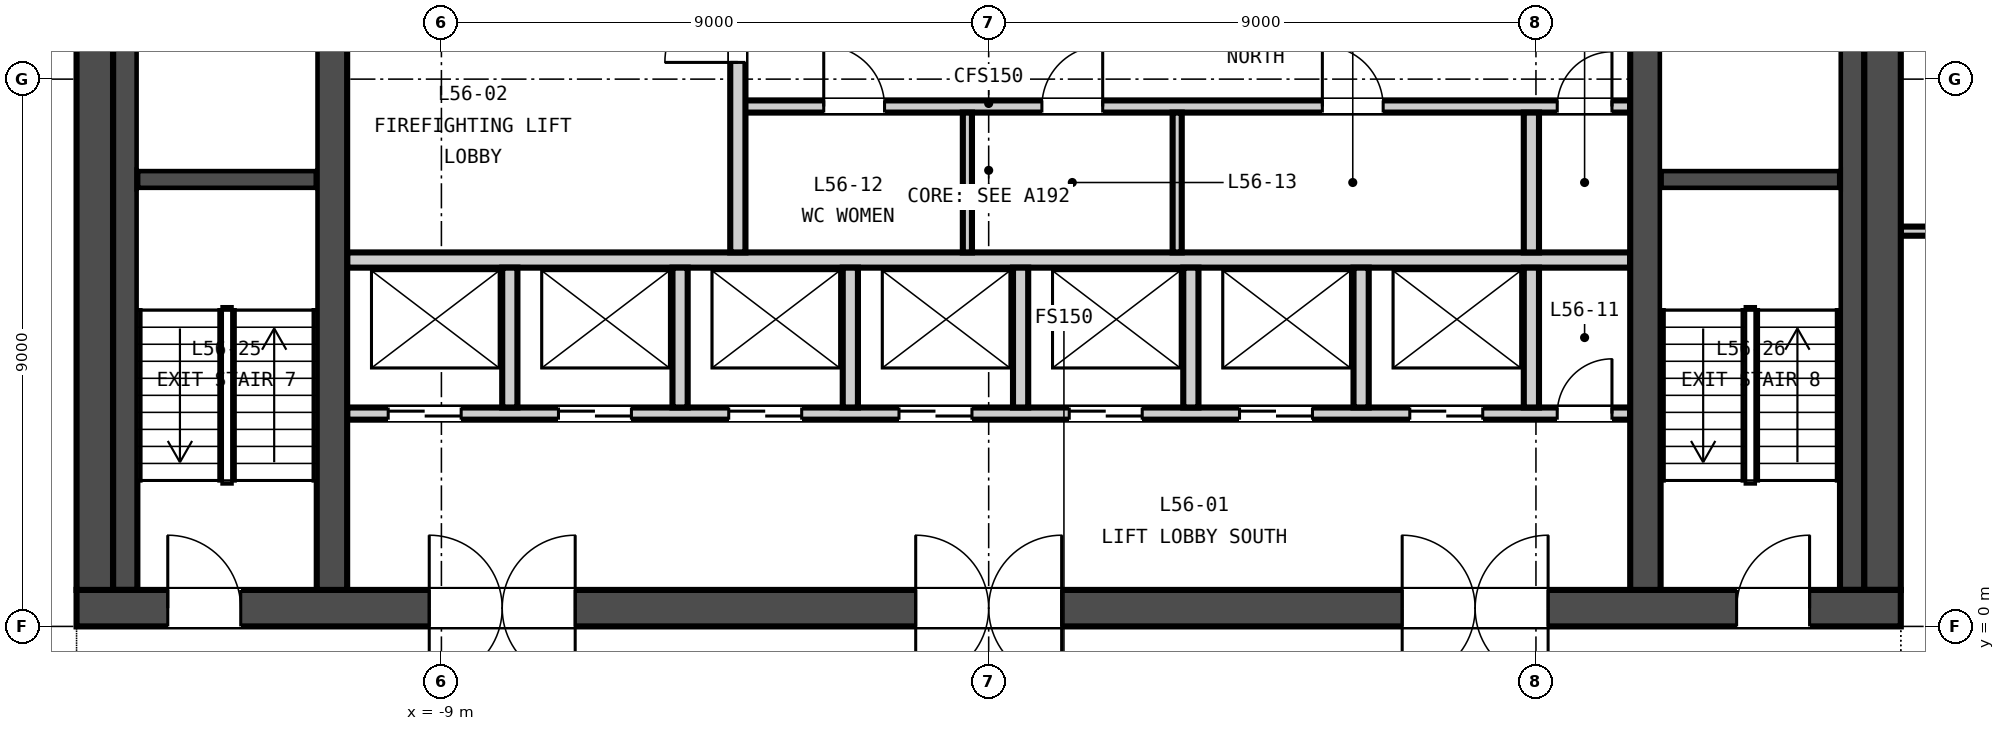
"""IFC4 building model, lengths in metres.
Left out: names, types, materials, properties, quantities, classifications, styles, units other than length and angle.
Written with IfcOpenShell. Run it as: python <this file> out.ifc"""

import sys

from ifc_helpers import new_model, si_unit, direction, frame, frame_2d, origin, place, context, subcontext, project, spatial, rectangle, extrude, element, fill, save


model = new_model("IFC4")
c1 = context("Model", 3, precision=1e-05, world=origin(), true_north=direction((0.0, 1.0)))
c2 = subcontext(c1, "Body", "Model", "MODEL_VIEW")
j1 = project(units=[si_unit("LENGTHUNIT", "METRE"), si_unit("PLANEANGLEUNIT", "RADIAN")], contexts=[c1])
p1 = place(None, origin())
s1 = spatial("IfcSite", under=j1, at=p1, CompositionType="ELEMENT")
p2 = place(p1, origin())
s2 = spatial("IfcBuilding", under=s1, at=p2, CompositionType="ELEMENT")
p3 = place(p2, frame((0.0, 0.0, 223.6)))
s3 = spatial("IfcBuildingStorey", under=s2, at=p3, CompositionType="ELEMENT", Elevation=223.6)
p4 = place(p3, frame((-15.0, 0.3, -0.15), z_axis=(0.0, 0.0, 1.0), x_axis=(1.0, 0.0, 0.0)))
e1 = element("IfcWall", 1, at=p4, inside=s3, PredefinedType="SOLIDWALL", context=c2, shape_type="SweptSolid", body=[
    extrude(rectangle(XDim=30.0, YDim=0.6, at=frame_2d((15.0, 0.0))), origin(), (0.0, 0.0, 1.0), 3.65),
])
p5 = place(p4, frame((5.8, 0.0, 0.15)))
e2 = element("IfcOpeningElement", 2, at=p5, cuts=e1, PredefinedType="OPENING", context=c2, shape_type="SweptSolid", body=[
    extrude(rectangle(XDim=2.4, YDim=2.4, at=frame_2d((1.2, 1.2))), frame((0.0, 0.31, 0.0), z_axis=(0.0, -1.0, 0.0), x_axis=(1.0, 0.0, 0.0)), (0.0, 0.0, 1.0), 0.62),
])
p6 = place(p4, frame((13.8, 0.0, 0.15)))
e3 = element("IfcOpeningElement", 3, at=p6, cuts=e1, PredefinedType="OPENING", context=c2, shape_type="SweptSolid", body=[
    extrude(rectangle(XDim=2.4, YDim=2.4, at=frame_2d((1.2, 1.2))), frame((0.0, 0.31, 0.0), z_axis=(0.0, -1.0, 0.0), x_axis=(1.0, 0.0, 0.0)), (0.0, 0.0, 1.0), 0.62),
])
p7 = place(p4, frame((21.8, 0.0, 0.15)))
e4 = element("IfcOpeningElement", 4, at=p7, cuts=e1, PredefinedType="OPENING", context=c2, shape_type="SweptSolid", body=[
    extrude(rectangle(XDim=2.4, YDim=2.4, at=frame_2d((1.2, 1.2))), frame((0.0, 0.31, 0.0), z_axis=(0.0, -1.0, 0.0), x_axis=(1.0, 0.0, 0.0)), (0.0, 0.0, 1.0), 0.62),
])
p8 = place(p4, frame((1.5, 0.0, 0.15)))
e5 = element("IfcOpeningElement", 5, at=p8, cuts=e1, PredefinedType="OPENING", context=c2, shape_type="SweptSolid", body=[
    extrude(rectangle(XDim=1.2, YDim=2.1, at=frame_2d((0.6, 1.05))), frame((0.0, 0.31, 0.0), z_axis=(0.0, -1.0, 0.0), x_axis=(1.0, 0.0, 0.0)), (0.0, 0.0, 1.0), 0.62),
])
p9 = place(p4, frame((27.3, 0.0, 0.15)))
e6 = element("IfcOpeningElement", 6, at=p9, cuts=e1, PredefinedType="OPENING", context=c2, shape_type="SweptSolid", body=[
    extrude(rectangle(XDim=1.2, YDim=2.1, at=frame_2d((0.6, 1.05))), frame((0.0, 0.31, 0.0), z_axis=(0.0, -1.0, 0.0), x_axis=(1.0, 0.0, 0.0)), (0.0, 0.0, 1.0), 0.62),
])
for number, where, z_axis, x_axis in (
    (7, (-14.7, 0.6, -0.15), (0.0, 0.0, 1.0), (0.0, 1.0, 0.0)),
    (8, (14.7, 0.6, -0.15), (0.0, 0.0, 1.0), (0.0, 1.0, 0.0)),
):
    element("IfcWall", number, at=place(p3, frame(where, z_axis=z_axis, x_axis=x_axis)), inside=s3, PredefinedType="SOLIDWALL", context=c2, shape_type="SweptSolid", body=[
        extrude(rectangle(XDim=13.8, YDim=0.6, at=frame_2d((6.9, 0.0))), origin(), (0.0, 0.0, 1.0), 3.65),
    ])
for number, where, z_axis, x_axis in (
    (9, (-10.8, 0.6, -0.15), (0.0, 0.0, 1.0), (0.0, 1.0, 0.0)),
    (10, (10.8, 0.6, -0.15), (0.0, 0.0, 1.0), (0.0, 1.0, 0.0)),
):
    element("IfcWall", number, at=place(p3, frame(where, z_axis=z_axis, x_axis=x_axis)), inside=s3, PredefinedType="SOLIDWALL", context=c2, shape_type="SweptSolid", body=[
        extrude(rectangle(XDim=13.8, YDim=0.5, at=frame_2d((6.9, 0.0))), origin(), (0.0, 0.0, 1.0), 3.65),
    ])
p10 = place(p3, frame((-10.55, 3.5, 0.0), z_axis=(0.0, 0.0, 1.0), x_axis=(1.0, 0.0, 0.0)))
e11 = element("IfcWall", 11, at=p10, inside=s3, PredefinedType="PARTITIONING", context=c2, shape_type="SweptSolid", body=[
    extrude(rectangle(XDim=21.1, YDim=0.2, at=frame_2d((10.55, 0.0))), origin(), (0.0, 0.0, 1.0), 3.5),
])
p11 = place(p10, frame((0.675, 0.0, 0.0)))
e12 = element("IfcOpeningElement", 12, at=p11, cuts=e11, PredefinedType="OPENING", context=c2, shape_type="SweptSolid", body=[
    extrude(rectangle(XDim=1.2, YDim=2.1, at=frame_2d((0.6, 1.05))), frame((0.0, 0.11, 0.0), z_axis=(0.0, -1.0, 0.0), x_axis=(1.0, 0.0, 0.0)), (0.0, 0.0, 1.0), 0.22),
])
p12 = place(p10, frame((3.475, 0.0, 0.0)))
e13 = element("IfcOpeningElement", 13, at=p12, cuts=e11, PredefinedType="OPENING", context=c2, shape_type="SweptSolid", body=[
    extrude(rectangle(XDim=1.2, YDim=2.1, at=frame_2d((0.6, 1.05))), frame((0.0, 0.11, 0.0), z_axis=(0.0, -1.0, 0.0), x_axis=(1.0, 0.0, 0.0)), (0.0, 0.0, 1.0), 0.22),
])
p13 = place(p10, frame((6.275, 0.0, 0.0)))
e14 = element("IfcOpeningElement", 14, at=p13, cuts=e11, PredefinedType="OPENING", context=c2, shape_type="SweptSolid", body=[
    extrude(rectangle(XDim=1.2, YDim=2.1, at=frame_2d((0.6, 1.05))), frame((0.0, 0.11, 0.0), z_axis=(0.0, -1.0, 0.0), x_axis=(1.0, 0.0, 0.0)), (0.0, 0.0, 1.0), 0.22),
])
p14 = place(p10, frame((9.075, 0.0, 0.0)))
e15 = element("IfcOpeningElement", 15, at=p14, cuts=e11, PredefinedType="OPENING", context=c2, shape_type="SweptSolid", body=[
    extrude(rectangle(XDim=1.2, YDim=2.1, at=frame_2d((0.6, 1.05))), frame((0.0, 0.11, 0.0), z_axis=(0.0, -1.0, 0.0), x_axis=(1.0, 0.0, 0.0)), (0.0, 0.0, 1.0), 0.22),
])
p15 = place(p10, frame((11.875, 0.0, 0.0)))
e16 = element("IfcOpeningElement", 16, at=p15, cuts=e11, PredefinedType="OPENING", context=c2, shape_type="SweptSolid", body=[
    extrude(rectangle(XDim=1.2, YDim=2.1, at=frame_2d((0.6, 1.05))), frame((0.0, 0.11, 0.0), z_axis=(0.0, -1.0, 0.0), x_axis=(1.0, 0.0, 0.0)), (0.0, 0.0, 1.0), 0.22),
])
p16 = place(p10, frame((14.675, 0.0, 0.0)))
e17 = element("IfcOpeningElement", 17, at=p16, cuts=e11, PredefinedType="OPENING", context=c2, shape_type="SweptSolid", body=[
    extrude(rectangle(XDim=1.2, YDim=2.1, at=frame_2d((0.6, 1.05))), frame((0.0, 0.11, 0.0), z_axis=(0.0, -1.0, 0.0), x_axis=(1.0, 0.0, 0.0)), (0.0, 0.0, 1.0), 0.22),
])
p17 = place(p10, frame((17.475, 0.0, 0.0)))
e18 = element("IfcOpeningElement", 18, at=p17, cuts=e11, PredefinedType="OPENING", context=c2, shape_type="SweptSolid", body=[
    extrude(rectangle(XDim=1.2, YDim=2.1, at=frame_2d((0.6, 1.05))), frame((0.0, 0.11, 0.0), z_axis=(0.0, -1.0, 0.0), x_axis=(1.0, 0.0, 0.0)), (0.0, 0.0, 1.0), 0.22),
])
p18 = place(p10, frame((19.9, 0.0, 0.0)))
e19 = element("IfcOpeningElement", 19, at=p18, cuts=e11, PredefinedType="OPENING", context=c2, shape_type="SweptSolid", body=[
    extrude(rectangle(XDim=0.9, YDim=2.1, at=frame_2d((0.45, 1.05))), frame((0.0, 0.11, 0.0), z_axis=(0.0, -1.0, 0.0), x_axis=(1.0, 0.0, 0.0)), (0.0, 0.0, 1.0), 0.22),
])
p19 = place(p3, frame((-10.55, 6.025, 0.0), z_axis=(0.0, 0.0, 1.0), x_axis=(1.0, 0.0, 0.0)))
e20 = element("IfcWall", 20, at=p19, inside=s3, PredefinedType="PARTITIONING", context=c2, shape_type="SweptSolid", body=[
    extrude(rectangle(XDim=21.1, YDim=0.25, at=frame_2d((10.55, 0.0))), origin(), (0.0, 0.0, 1.0), 3.5),
])
p20 = place(p3, frame((-4.125, 8.55, 0.0), z_axis=(0.0, 0.0, 1.0), x_axis=(1.0, 0.0, 0.0)))
e21 = element("IfcWall", 21, at=p20, inside=s3, PredefinedType="PARTITIONING", context=c2, shape_type="SweptSolid", body=[
    extrude(rectangle(XDim=14.675, YDim=0.2, at=frame_2d((7.337, 0.0))), origin(), (0.0, 0.0, 1.0), 3.5),
])
p21 = place(p20, frame((1.413, 0.0, 0.0)))
e22 = element("IfcOpeningElement", 22, at=p21, cuts=e21, PredefinedType="OPENING", context=c2, shape_type="SweptSolid", body=[
    extrude(rectangle(XDim=1.0, YDim=2.1, at=frame_2d((0.5, 1.05))), frame((0.0, 0.11, 0.0), z_axis=(0.0, -1.0, 0.0), x_axis=(1.0, 0.0, 0.0)), (0.0, 0.0, 1.0), 0.22),
])
p22 = place(p20, frame((5.0, 0.0, 0.0)))
e23 = element("IfcOpeningElement", 23, at=p22, cuts=e21, PredefinedType="OPENING", context=c2, shape_type="SweptSolid", body=[
    extrude(rectangle(XDim=1.0, YDim=2.1, at=frame_2d((0.5, 1.05))), frame((0.0, 0.11, 0.0), z_axis=(0.0, -1.0, 0.0), x_axis=(1.0, 0.0, 0.0)), (0.0, 0.0, 1.0), 0.22),
])
p23 = place(p20, frame((9.613, 0.0, 0.0)))
e24 = element("IfcOpeningElement", 24, at=p23, cuts=e21, PredefinedType="OPENING", context=c2, shape_type="SweptSolid", body=[
    extrude(rectangle(XDim=1.0, YDim=2.1, at=frame_2d((0.5, 1.05))), frame((0.0, 0.11, 0.0), z_axis=(0.0, -1.0, 0.0), x_axis=(1.0, 0.0, 0.0)), (0.0, 0.0, 1.0), 0.22),
])
p24 = place(p20, frame((13.475, 0.0, 0.0)))
e25 = element("IfcOpeningElement", 25, at=p24, cuts=e21, PredefinedType="OPENING", context=c2, shape_type="SweptSolid", body=[
    extrude(rectangle(XDim=0.9, YDim=2.1, at=frame_2d((0.45, 1.05))), frame((0.0, 0.11, 0.0), z_axis=(0.0, -1.0, 0.0), x_axis=(1.0, 0.0, 0.0)), (0.0, 0.0, 1.0), 0.22),
])
p25 = place(p3, frame((-4.125, 6.15, 0.0), z_axis=(0.0, 0.0, 1.0), x_axis=(0.0, 1.0, 0.0)))
e26 = element("IfcWall", 26, at=p25, inside=s3, PredefinedType="PARTITIONING", context=c2, shape_type="SweptSolid", body=[
    extrude(rectangle(XDim=4.95, YDim=0.25, at=frame_2d((2.475, 0.0))), origin(), (0.0, 0.0, 1.0), 3.5),
])
p26 = place(p25, frame((3.125, 0.0, 0.0)))
e27 = element("IfcOpeningElement", 27, at=p26, cuts=e26, PredefinedType="OPENING", context=c2, shape_type="SweptSolid", body=[
    extrude(rectangle(XDim=1.2, YDim=2.1, at=frame_2d((0.6, 1.05))), frame((0.0, 0.135, 0.0), z_axis=(0.0, -1.0, 0.0), x_axis=(1.0, 0.0, 0.0)), (0.0, 0.0, 1.0), 0.27),
])
for number, where, z_axis, x_axis in (
    (28, (-7.875, 3.6, 0.0), (0.0, 0.0, 1.0), (0.0, 1.0, 0.0)),
    (29, (-5.075, 3.6, 0.0), (0.0, 0.0, 1.0), (0.0, 1.0, 0.0)),
    (30, (-2.275, 3.6, 0.0), (0.0, 0.0, 1.0), (0.0, 1.0, 0.0)),
    (31, (0.525, 3.6, 0.0), (0.0, 0.0, 1.0), (0.0, 1.0, 0.0)),
    (32, (3.325, 3.6, 0.0), (0.0, 0.0, 1.0), (0.0, 1.0, 0.0)),
    (33, (6.125, 3.6, 0.0), (0.0, 0.0, 1.0), (0.0, 1.0, 0.0)),
    (34, (8.925, 3.6, 0.0), (0.0, 0.0, 1.0), (0.0, 1.0, 0.0)),
):
    element("IfcWall", number, at=place(p3, frame(where, z_axis=z_axis, x_axis=x_axis)), inside=s3, PredefinedType="PARTITIONING", context=c2, shape_type="SweptSolid", body=[
        extrude(rectangle(XDim=2.3, YDim=0.25, at=frame_2d((1.15, 0.0))), origin(), (0.0, 0.0, 1.0), 3.5),
    ])
for number, where, z_axis, x_axis in (
    (35, (-0.35, 6.15, 0.0), (0.0, 0.0, 1.0), (0.0, 1.0, 0.0)),
    (36, (3.1, 6.15, 0.0), (0.0, 0.0, 1.0), (0.0, 1.0, 0.0)),
):
    element("IfcWall", number, at=place(p3, frame(where, z_axis=z_axis, x_axis=x_axis)), inside=s3, PredefinedType="PARTITIONING", context=c2, shape_type="SweptSolid", body=[
        extrude(rectangle(XDim=2.3, YDim=0.15, at=frame_2d((1.15, 0.0))), origin(), (0.0, 0.0, 1.0), 3.5),
    ])
p27 = place(p3, frame((8.925, 6.15, 0.0), z_axis=(0.0, 0.0, 1.0), x_axis=(0.0, 1.0, 0.0)))
e37 = element("IfcWall", 37, at=p27, inside=s3, PredefinedType="PARTITIONING", context=c2, shape_type="SweptSolid", body=[
    extrude(rectangle(XDim=2.3, YDim=0.25, at=frame_2d((1.15, 0.0))), origin(), (0.0, 0.0, 1.0), 3.5),
])
p28 = place(p3, frame((-14.0, 7.35, 0.0), z_axis=(0.0, 0.0, 1.0), x_axis=(1.0, 0.0, 0.0)))
e38 = element("IfcWall", 38, at=p28, inside=s3, PredefinedType="SOLIDWALL", context=c2, shape_type="SweptSolid", body=[
    extrude(rectangle(XDim=2.95, YDim=0.3, at=frame_2d((1.475, 0.0))), origin(), (0.0, 0.0, 1.0), 3.5),
])
p29 = place(p3, frame((-14.2, 0.6, 0.0), z_axis=(0.0, 0.0, 1.0), x_axis=(0.0, 1.0, 0.0)))
e39 = element("IfcWall", 39, at=p29, inside=s3, PredefinedType="SOLIDWALL", context=c2, shape_type="SweptSolid", body=[
    extrude(rectangle(XDim=13.8, YDim=0.4, at=frame_2d((6.9, 0.0))), origin(), (0.0, 0.0, 1.0), 3.5),
])
p30 = place(p3, frame((11.05, 7.35, 0.0), z_axis=(0.0, 0.0, 1.0), x_axis=(1.0, 0.0, 0.0)))
e40 = element("IfcWall", 40, at=p30, inside=s3, PredefinedType="SOLIDWALL", context=c2, shape_type="SweptSolid", body=[
    extrude(rectangle(XDim=2.95, YDim=0.3, at=frame_2d((1.475, 0.0))), origin(), (0.0, 0.0, 1.0), 3.5),
])
p31 = place(p3, frame((14.2, 0.6, 0.0), z_axis=(0.0, 0.0, 1.0), x_axis=(0.0, 1.0, 0.0)))
e41 = element("IfcWall", 41, at=p31, inside=s3, PredefinedType="SOLIDWALL", context=c2, shape_type="SweptSolid", body=[
    extrude(rectangle(XDim=13.8, YDim=0.4, at=frame_2d((6.9, 0.0))), origin(), (0.0, 0.0, 1.0), 3.5),
])
p32 = place(p3, frame((15.0, 6.5, 0.0), z_axis=(0.0, 0.0, 1.0), x_axis=(1.0, 0.0, 0.0)))
e42 = element("IfcWall", 42, at=p32, inside=s3, PredefinedType="PARTITIONING", context=c2, shape_type="SweptSolid", body=[
    extrude(rectangle(XDim=2.925, YDim=0.15, at=frame_2d((1.462, 0.0))), origin(), (0.0, 0.0, 1.0), 2.75),
])
p33 = place(p26, origin())
e43 = element("IfcDoor", 43, at=p33, inside=s3, OperationType="SINGLE_SWING_LEFT", PredefinedType="DOOR", context=c2, shape_type="SweptSolid", body=[
    extrude(rectangle(XDim=1.2, YDim=2.1, at=frame_2d((0.6, 1.05))), frame((0.0, 0.025, 0.0), z_axis=(0.0, -1.0, 0.0), x_axis=(1.0, 0.0, 0.0)), (0.0, 0.0, 1.0), 0.05),
])
fill(e27, e43)
p34 = place(p11, origin())
e44 = element("IfcDoor", 44, at=p34, inside=s3, OperationType="DOUBLE_DOOR_SLIDING", PredefinedType="DOOR", context=c2, shape_type="SweptSolid", body=[
    extrude(rectangle(XDim=1.2, YDim=2.1, at=frame_2d((0.6, 1.05))), frame((0.0, 0.025, 0.0), z_axis=(0.0, -1.0, 0.0), x_axis=(1.0, 0.0, 0.0)), (0.0, 0.0, 1.0), 0.05),
])
fill(e12, e44)
p35 = place(p12, origin())
e45 = element("IfcDoor", 45, at=p35, inside=s3, OperationType="DOUBLE_DOOR_SLIDING", PredefinedType="DOOR", context=c2, shape_type="SweptSolid", body=[
    extrude(rectangle(XDim=1.2, YDim=2.1, at=frame_2d((0.6, 1.05))), frame((0.0, 0.025, 0.0), z_axis=(0.0, -1.0, 0.0), x_axis=(1.0, 0.0, 0.0)), (0.0, 0.0, 1.0), 0.05),
])
fill(e13, e45)
p36 = place(p13, origin())
e46 = element("IfcDoor", 46, at=p36, inside=s3, OperationType="DOUBLE_DOOR_SLIDING", PredefinedType="DOOR", context=c2, shape_type="SweptSolid", body=[
    extrude(rectangle(XDim=1.2, YDim=2.1, at=frame_2d((0.6, 1.05))), frame((0.0, 0.025, 0.0), z_axis=(0.0, -1.0, 0.0), x_axis=(1.0, 0.0, 0.0)), (0.0, 0.0, 1.0), 0.05),
])
fill(e14, e46)
p37 = place(p14, origin())
e47 = element("IfcDoor", 47, at=p37, inside=s3, OperationType="DOUBLE_DOOR_SLIDING", PredefinedType="DOOR", context=c2, shape_type="SweptSolid", body=[
    extrude(rectangle(XDim=1.2, YDim=2.1, at=frame_2d((0.6, 1.05))), frame((0.0, 0.025, 0.0), z_axis=(0.0, -1.0, 0.0), x_axis=(1.0, 0.0, 0.0)), (0.0, 0.0, 1.0), 0.05),
])
fill(e15, e47)
p38 = place(p15, origin())
e48 = element("IfcDoor", 48, at=p38, inside=s3, OperationType="DOUBLE_DOOR_SLIDING", PredefinedType="DOOR", context=c2, shape_type="SweptSolid", body=[
    extrude(rectangle(XDim=1.2, YDim=2.1, at=frame_2d((0.6, 1.05))), frame((0.0, 0.025, 0.0), z_axis=(0.0, -1.0, 0.0), x_axis=(1.0, 0.0, 0.0)), (0.0, 0.0, 1.0), 0.05),
])
fill(e16, e48)
p39 = place(p16, origin())
e49 = element("IfcDoor", 49, at=p39, inside=s3, OperationType="DOUBLE_DOOR_SLIDING", PredefinedType="DOOR", context=c2, shape_type="SweptSolid", body=[
    extrude(rectangle(XDim=1.2, YDim=2.1, at=frame_2d((0.6, 1.05))), frame((0.0, 0.025, 0.0), z_axis=(0.0, -1.0, 0.0), x_axis=(1.0, 0.0, 0.0)), (0.0, 0.0, 1.0), 0.05),
])
fill(e17, e49)
p40 = place(p17, origin())
e50 = element("IfcDoor", 50, at=p40, inside=s3, OperationType="DOUBLE_DOOR_SLIDING", PredefinedType="DOOR", context=c2, shape_type="SweptSolid", body=[
    extrude(rectangle(XDim=1.2, YDim=2.1, at=frame_2d((0.6, 1.05))), frame((0.0, 0.025, 0.0), z_axis=(0.0, -1.0, 0.0), x_axis=(1.0, 0.0, 0.0)), (0.0, 0.0, 1.0), 0.05),
])
fill(e18, e50)
p41 = place(p18, origin())
e51 = element("IfcDoor", 51, at=p41, inside=s3, OperationType="SINGLE_SWING_RIGHT", PredefinedType="DOOR", context=c2, shape_type="SweptSolid", body=[
    extrude(rectangle(XDim=0.9, YDim=2.1, at=frame_2d((0.45, 1.05))), frame((0.0, 0.025, 0.0), z_axis=(0.0, -1.0, 0.0), x_axis=(1.0, 0.0, 0.0)), (0.0, 0.0, 1.0), 0.05),
])
fill(e19, e51)
p42 = place(p21, origin())
e52 = element("IfcDoor", 52, at=p42, inside=s3, OperationType="SINGLE_SWING_LEFT", PredefinedType="DOOR", context=c2, shape_type="SweptSolid", body=[
    extrude(rectangle(XDim=1.0, YDim=2.1, at=frame_2d((0.5, 1.05))), frame((0.0, 0.025, 0.0), z_axis=(0.0, -1.0, 0.0), x_axis=(1.0, 0.0, 0.0)), (0.0, 0.0, 1.0), 0.05),
])
fill(e22, e52)
p43 = place(p22, origin())
e53 = element("IfcDoor", 53, at=p43, inside=s3, OperationType="SINGLE_SWING_RIGHT", PredefinedType="DOOR", context=c2, shape_type="SweptSolid", body=[
    extrude(rectangle(XDim=1.0, YDim=2.1, at=frame_2d((0.5, 1.05))), frame((0.0, 0.025, 0.0), z_axis=(0.0, -1.0, 0.0), x_axis=(1.0, 0.0, 0.0)), (0.0, 0.0, 1.0), 0.05),
])
fill(e23, e53)
p44 = place(p23, origin())
e54 = element("IfcDoor", 54, at=p44, inside=s3, OperationType="SINGLE_SWING_LEFT", PredefinedType="DOOR", context=c2, shape_type="SweptSolid", body=[
    extrude(rectangle(XDim=1.0, YDim=2.1, at=frame_2d((0.5, 1.05))), frame((0.0, 0.025, 0.0), z_axis=(0.0, -1.0, 0.0), x_axis=(1.0, 0.0, 0.0)), (0.0, 0.0, 1.0), 0.05),
])
fill(e24, e54)
p45 = place(p24, origin())
e55 = element("IfcDoor", 55, at=p45, inside=s3, OperationType="SINGLE_SWING_RIGHT", PredefinedType="DOOR", context=c2, shape_type="SweptSolid", body=[
    extrude(rectangle(XDim=0.9, YDim=2.1, at=frame_2d((0.45, 1.05))), frame((0.0, 0.025, 0.0), z_axis=(0.0, -1.0, 0.0), x_axis=(1.0, 0.0, 0.0)), (0.0, 0.0, 1.0), 0.05),
])
fill(e25, e55)
p46 = place(p5, origin())
e56 = element("IfcDoor", 56, at=p46, inside=s3, OperationType="DOUBLE_DOOR_DOUBLE_SWING", PredefinedType="DOOR", context=c2, shape_type="SweptSolid", body=[
    extrude(rectangle(XDim=2.4, YDim=2.4, at=frame_2d((1.2, 1.2))), frame((0.0, 0.025, 0.0), z_axis=(0.0, -1.0, 0.0), x_axis=(1.0, 0.0, 0.0)), (0.0, 0.0, 1.0), 0.05),
])
fill(e2, e56)
p47 = place(p6, origin())
e57 = element("IfcDoor", 57, at=p47, inside=s3, OperationType="DOUBLE_DOOR_DOUBLE_SWING", PredefinedType="DOOR", context=c2, shape_type="SweptSolid", body=[
    extrude(rectangle(XDim=2.4, YDim=2.4, at=frame_2d((1.2, 1.2))), frame((0.0, 0.025, 0.0), z_axis=(0.0, -1.0, 0.0), x_axis=(1.0, 0.0, 0.0)), (0.0, 0.0, 1.0), 0.05),
])
fill(e3, e57)
p48 = place(p7, origin())
e58 = element("IfcDoor", 58, at=p48, inside=s3, OperationType="DOUBLE_DOOR_DOUBLE_SWING", PredefinedType="DOOR", context=c2, shape_type="SweptSolid", body=[
    extrude(rectangle(XDim=2.4, YDim=2.4, at=frame_2d((1.2, 1.2))), frame((0.0, 0.025, 0.0), z_axis=(0.0, -1.0, 0.0), x_axis=(1.0, 0.0, 0.0)), (0.0, 0.0, 1.0), 0.05),
])
fill(e4, e58)
p49 = place(p8, origin())
e59 = element("IfcDoor", 59, at=p49, inside=s3, OperationType="SINGLE_SWING_LEFT", PredefinedType="DOOR", context=c2, shape_type="SweptSolid", body=[
    extrude(rectangle(XDim=1.2, YDim=2.1, at=frame_2d((0.6, 1.05))), frame((0.0, 0.025, 0.0), z_axis=(0.0, -1.0, 0.0), x_axis=(1.0, 0.0, 0.0)), (0.0, 0.0, 1.0), 0.05),
])
fill(e5, e59)
p50 = place(p9, origin())
e60 = element("IfcDoor", 60, at=p50, inside=s3, OperationType="SINGLE_SWING_RIGHT", PredefinedType="DOOR", context=c2, shape_type="SweptSolid", body=[
    extrude(rectangle(XDim=1.2, YDim=2.1, at=frame_2d((0.6, 1.05))), frame((0.0, 0.025, 0.0), z_axis=(0.0, -1.0, 0.0), x_axis=(1.0, 0.0, 0.0)), (0.0, 0.0, 1.0), 0.05),
])
fill(e6, e60)
save(model, sys.argv[1])
